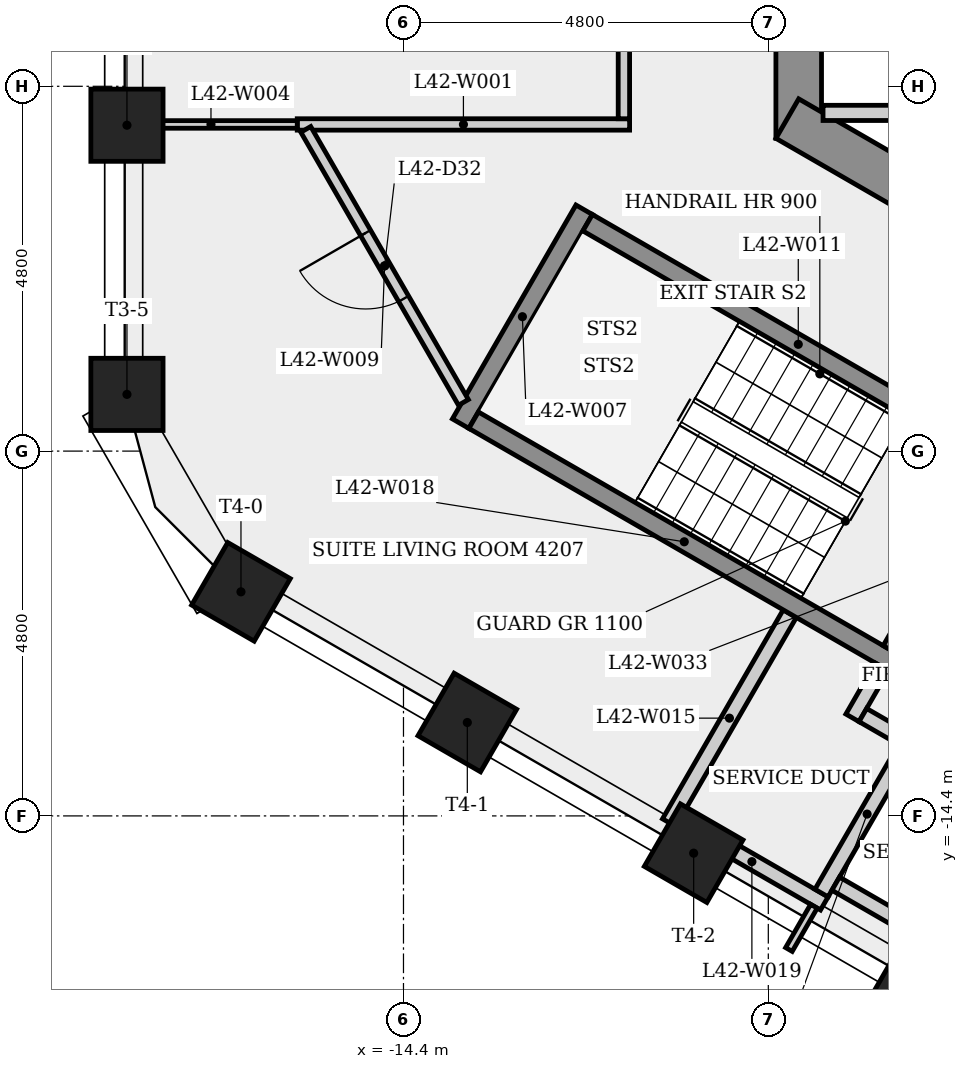
"""IFC4 building model, lengths in metres.
Left out: names, types, materials, properties, quantities, classifications, styles, units other than length and angle.
Written with IfcOpenShell. Run it as: python <this file> out.ifc"""

import sys

from ifc_helpers import new_model, si_unit, direction, frame, frame_2d, origin, origin_2d, place, context, subcontext, project, spatial, rectangle, extrude, element, fill, save


model = new_model("IFC4")
c1 = context("Model", 3, precision=1e-05, world=origin(), true_north=direction((0.0, 1.0)))
c2 = subcontext(c1, "Body", "Model", "MODEL_VIEW")
j1 = project(units=[si_unit("LENGTHUNIT", "METRE"), si_unit("PLANEANGLEUNIT", "RADIAN")], contexts=[c1])
p1 = place(None, origin())
s1 = spatial("IfcSite", under=j1, at=p1, CompositionType="ELEMENT")
p2 = place(p1, origin())
s2 = spatial("IfcBuilding", under=s1, at=p2, CompositionType="ELEMENT")
p3 = place(p2, frame((0.0, 0.0, 159.5)))
s3 = spatial("IfcBuildingStorey", under=s2, at=p3, CompositionType="ELEMENT", Elevation=159.5)
p4 = place(p3, frame((-9.2, 5.485, 0.0), z_axis=(0.0, 0.0, 1.0), x_axis=(0.0, -1.0, 0.0)))
e1 = element("IfcWall", 1, at=p4, inside=s3, PredefinedType="SHEAR", context=c2, shape_type="SweptSolid", body=[
    extrude(rectangle(XDim=10.97, YDim=0.6, at=frame_2d((5.485, 0.0))), origin(), (0.0, 0.0, 1.0), 3.4),
])
p5 = place(p4, frame((8.516, 0.0, 0.0)))
e2 = element("IfcOpeningElement", 2, at=p5, cuts=e1, PredefinedType="OPENING", context=c2, shape_type="SweptSolid", body=[
    extrude(rectangle(XDim=0.9, YDim=2.1, at=frame_2d((0.45, 1.05))), frame((0.0, 0.31, 0.0), z_axis=(0.0, -1.0, 0.0), x_axis=(1.0, 0.0, 0.0)), (0.0, 0.0, 1.0), 0.62),
])
p6 = place(p4, frame((4.685, 0.0, 0.0)))
e3 = element("IfcOpeningElement", 3, at=p6, cuts=e1, PredefinedType="OPENING", context=c2, shape_type="SweptSolid", body=[
    extrude(rectangle(XDim=1.6, YDim=2.1, at=frame_2d((0.8, 1.05))), frame((0.0, 0.31, 0.0), z_axis=(0.0, -1.0, 0.0), x_axis=(1.0, 0.0, 0.0)), (0.0, 0.0, 1.0), 0.62),
])
p7 = place(p3, frame((-9.35, -5.225, 0.0), z_axis=(0.0, 0.0, 1.0), x_axis=(0.866023993627, -0.500002442456, 0.0)))
e4 = element("IfcWall", 4, at=p7, inside=s3, PredefinedType="SHEAR", context=c2, shape_type="SweptSolid", body=[
    extrude(rectangle(XDim=10.97, YDim=0.6, at=frame_2d((5.485, 0.0))), origin(), (0.0, 0.0, 1.0), 3.4),
])
p8 = place(p7, frame((4.816, 0.0, 0.0)))
e5 = element("IfcOpeningElement", 5, at=p8, cuts=e4, PredefinedType="OPENING", context=c2, shape_type="SweptSolid", body=[
    extrude(rectangle(XDim=0.9, YDim=2.1, at=frame_2d((0.45, 1.05))), frame((0.0, 0.31, 0.0), z_axis=(0.0, -1.0, 0.0), x_axis=(1.0, 0.0, 0.0)), (0.0, 0.0, 1.0), 0.62),
])
for number, where, z_axis, x_axis in (
    (6, (-18.038, -5.312, 0.0), (0.0, 0.0, 1.0), (-1.0, 0.0, 0.0)),
    (7, (-18.038, -8.854, 0.0), (0.0, 0.0, 1.0), (-1.0, 0.0, 0.0)),
    (8, (-16.538, -11.452, 0.0), (0.0, 0.0, 1.0), (-0.5, -0.866, 0.0)),
    (9, (-13.56, -13.171, 0.0), (0.0, 0.0, 1.0), (-0.5, -0.866, 0.0)),
    (10, (-10.582, -14.89, 0.0), (0.0, 0.0, 1.0), (-0.5, -0.866, 0.0)),
    (11, (-7.604, -16.61, 0.0), (0.0, 0.0, 1.0), (-0.5, -0.866, 0.0)),
):
    element("IfcColumn", number, at=place(p3, frame(where, z_axis=z_axis, x_axis=x_axis)), inside=s3, PredefinedType="COLUMN", context=c2, shape_type="SweptSolid", body=[
        extrude(rectangle(XDim=0.95, YDim=0.95, at=origin_2d()), origin(), (0.0, 0.0, 1.0), 3.4),
    ])
p9 = place(p3, frame((-15.798, -5.302, 0.0), z_axis=(0.0, 0.0, 1.0), x_axis=(1.0, 0.0, 0.0)))
e12 = element("IfcWall", 12, at=p9, inside=s3, PredefinedType="PARTITIONING", context=c2, shape_type="SweptSolid", body=[
    extrude(rectangle(XDim=4.373, YDim=0.15, at=frame_2d((2.187, 0.0))), origin(), (0.0, 0.0, 1.0), 3.05),
])
p10 = place(p3, frame((-15.798, -5.302, 0.0), z_axis=(0.0, 0.0, 1.0), x_axis=(-1.0, 0.0, 0.0)))
e13 = element("IfcWall", 13, at=p10, inside=s3, PredefinedType="PARTITIONING", context=c2, shape_type="SweptSolid", body=[
    extrude(rectangle(XDim=2.27, YDim=0.1, at=frame_2d((1.135, 0.0))), origin(), (0.0, 0.0, 1.0), 3.05),
])
p11 = place(p3, frame((-13.648, -9.239, 0.0), z_axis=(0.0, 0.0, 1.0), x_axis=(0.500017246033, 0.866015446554, 0.0)))
e14 = element("IfcWall", 14, at=p11, inside=s3, PredefinedType="SHEAR", context=c2, shape_type="SweptSolid", body=[
    extrude(rectangle(XDim=3.25, YDim=0.25, at=frame_2d((1.625, 0.0))), origin(), (0.0, 0.0, 1.0), 3.05),
])
p12 = place(p3, frame((-13.611, -8.959, 0.0), z_axis=(0.0, 0.0, 1.0), x_axis=(-0.499994179242, 0.866028764375, 0.0)))
e15 = element("IfcWall", 15, at=p12, inside=s3, PredefinedType="PARTITIONING", context=c2, shape_type="SweptSolid", body=[
    extrude(rectangle(XDim=4.148, YDim=0.15, at=frame_2d((2.074, 0.0))), origin(), (0.0, 0.0, 1.0), 3.05),
])
p13 = place(p12, frame((1.574, 0.0, 0.0)))
e16 = element("IfcOpeningElement", 16, at=p13, cuts=e15, PredefinedType="OPENING", context=c2, shape_type="SweptSolid", body=[
    extrude(rectangle(XDim=1.0, YDim=2.1, at=frame_2d((0.5, 1.05))), frame((0.0, 0.085, 0.0), z_axis=(0.0, -1.0, 0.0), x_axis=(1.0, 0.0, 0.0)), (0.0, 0.0, 1.0), 0.17),
])
p14 = place(p3, frame((-11.977, -6.595, 0.0), z_axis=(0.0, 0.0, 1.0), x_axis=(0.866025499775, -0.499999833739, 0.0)))
e17 = element("IfcWall", 17, at=p14, inside=s3, PredefinedType="SHEAR", context=c2, shape_type="SweptSolid", body=[
    extrude(rectangle(XDim=6.4, YDim=0.25, at=frame_2d((3.2, 0.0))), origin(), (0.0, 0.0, 1.0), 3.05),
])
p15 = place(p14, frame((5.025, 0.0, 0.0)))
e18 = element("IfcOpeningElement", 18, at=p15, cuts=e17, PredefinedType="OPENING", context=c2, shape_type="SweptSolid", body=[
    extrude(rectangle(XDim=1.0, YDim=2.1, at=frame_2d((0.5, 1.05))), frame((0.0, 0.135, 0.0), z_axis=(0.0, -1.0, 0.0), x_axis=(1.0, 0.0, 0.0)), (0.0, 0.0, 1.0), 0.27),
])
p16 = place(p3, frame((-11.5, -5.227, 0.0), z_axis=(0.0, 0.0, 1.0), x_axis=(0.0, 1.0, 0.0)))
e19 = element("IfcWall", 19, at=p16, inside=s3, PredefinedType="PARTITIONING", context=c2, shape_type="SweptSolid", body=[
    extrude(rectangle(XDim=10.604, YDim=0.15, at=frame_2d((5.302, 0.0))), origin(), (0.0, 0.0, 1.0), 3.05),
])
p17 = place(p16, frame((9.229, 0.0, 0.0)))
e20 = element("IfcOpeningElement", 20, at=p17, cuts=e19, PredefinedType="OPENING", context=c2, shape_type="SweptSolid", body=[
    extrude(rectangle(XDim=0.9, YDim=2.1, at=frame_2d((0.45, 1.05))), frame((0.0, 0.085, 0.0), z_axis=(0.0, -1.0, 0.0), x_axis=(1.0, 0.0, 0.0)), (0.0, 0.0, 1.0), 0.17),
])
p18 = place(p16, frame((2.982, 0.0, 0.0)))
e21 = element("IfcOpeningElement", 21, at=p18, cuts=e19, PredefinedType="OPENING", context=c2, shape_type="SweptSolid", body=[
    extrude(rectangle(XDim=1.0, YDim=2.1, at=frame_2d((0.5, 1.05))), frame((0.0, 0.085, 0.0), z_axis=(0.0, -1.0, 0.0), x_axis=(1.0, 0.0, 0.0)), (0.0, 0.0, 1.0), 0.17),
])
p19 = place(p3, frame((-10.905, -14.489, 0.0), z_axis=(0.0, 0.0, 1.0), x_axis=(0.499959856469, 0.866048579423, 0.0)))
e22 = element("IfcWall", 22, at=p19, inside=s3, PredefinedType="PLUMBINGWALL", context=c2, shape_type="SweptSolid", body=[
    extrude(rectangle(XDim=3.175, YDim=0.2, at=frame_2d((1.587, 0.0))), origin(), (0.0, 0.0, 1.0), 3.05),
])
p20 = place(p3, frame((-13.477, -9.193, 0.0), z_axis=(0.0, 0.0, 1.0), x_axis=(0.866025499775, -0.499999833739, 0.0)))
e23 = element("IfcWall", 23, at=p20, inside=s3, PredefinedType="SHEAR", context=c2, shape_type="SweptSolid", body=[
    extrude(rectangle(XDim=6.4, YDim=0.25, at=frame_2d((3.2, 0.0))), origin(), (0.0, 0.0, 1.0), 3.05),
])
p21 = place(p3, frame((-8.863, -15.552, 0.0), z_axis=(0.0, 0.0, 1.0), x_axis=(-0.866035918664, 0.499981787252, 0.0)))
e24 = element("IfcWall", 24, at=p21, inside=s3, PredefinedType="PLUMBINGWALL", context=c2, shape_type="SweptSolid", body=[
    extrude(rectangle(XDim=2.2, YDim=0.2, at=frame_2d((1.1, 0.0))), origin(), (0.0, 0.0, 1.0), 3.05),
])
p22 = place(p3, frame((-9.0, -15.588, 0.0), z_axis=(0.0, 0.0, 1.0), x_axis=(-0.500011643316, -0.866018681408, 0.0)))
e25 = element("IfcWall", 25, at=p22, inside=s3, PredefinedType="PARTITIONING", context=c2, shape_type="SweptSolid", body=[
    extrude(rectangle(XDim=0.658, YDim=0.1, at=frame_2d((0.329, 0.0))), origin(), (0.0, 0.0, 1.0), 3.05),
])
p23 = place(p3, frame((-8.88, -5.15, 0.0), z_axis=(0.0, 0.0, 1.0), x_axis=(1.0, 0.0, 0.0)))
e26 = element("IfcWall", 26, at=p23, inside=s3, PredefinedType="PARTITIONING", context=c2, shape_type="SweptSolid", body=[
    extrude(rectangle(XDim=11.205, YDim=0.2, at=frame_2d((5.603, 0.0))), origin(), (0.0, 0.0, 1.0), 3.05),
])
p24 = place(p3, frame((-8.493, -13.11, 0.0), z_axis=(0.0, 0.0, 1.0), x_axis=(0.500067724834, 0.865986299303, 0.0)))
e27 = element("IfcWall", 27, at=p24, inside=s3, PredefinedType="PLUMBINGWALL", context=c2, shape_type="SweptSolid", body=[
    extrude(rectangle(XDim=0.775, YDim=0.2, at=frame_2d((0.388, 0.0))), origin(), (0.0, 0.0, 1.0), 3.05),
])
p25 = place(p3, frame((-7.7, -13.337, 0.0), z_axis=(0.0, 0.0, 1.0), x_axis=(-0.500001309137, -0.866024647952, 0.0)))
e28 = element("IfcWall", 28, at=p25, inside=s3, PredefinedType="PLUMBINGWALL", context=c2, shape_type="SweptSolid", body=[
    extrude(rectangle(XDim=2.4, YDim=0.2, at=frame_2d((1.2, 0.0))), origin(), (0.0, 0.0, 1.0), 3.05),
])
p26 = place(p3, frame((-7.836, -13.373, 0.0), z_axis=(0.0, 0.0, 1.0), x_axis=(-0.866232998003, 0.499640263761, 0.0)))
e29 = element("IfcWall", 29, at=p26, inside=s3, PredefinedType="PLUMBINGWALL", context=c2, shape_type="SweptSolid", body=[
    extrude(rectangle(XDim=0.6, YDim=0.2, at=frame_2d((0.3, 0.0))), origin(), (0.0, 0.0, 1.0), 3.05),
])
p27 = place(p3, frame((-6.808, -16.392, 0.0), z_axis=(0.0, 0.0, 1.0), x_axis=(-0.866008176907, 0.50002983664, 0.0)))
e30 = element("IfcWall", 30, at=p27, inside=s3, PredefinedType="PLUMBINGWALL", context=c2, shape_type="SweptSolid", body=[
    extrude(rectangle(XDim=2.2, YDim=0.2, at=frame_2d((1.1, 0.0))), origin(), (0.0, 0.0, 1.0), 3.05),
])
p28 = place(p3, frame((-6.605, -9.841, 0.0), z_axis=(0.0, 0.0, 1.0), x_axis=(-0.499996545922, -0.866027397988, 0.0)))
e31 = element("IfcWall", 31, at=p28, inside=s3, PredefinedType="SHEAR", context=c2, shape_type="SweptSolid", body=[
    extrude(rectangle(XDim=2.75, YDim=0.25, at=frame_2d((1.375, 0.0))), origin(), (0.0, 0.0, 1.0), 3.05),
])
p29 = place(p28, frame((0.875, 0.0, 0.0)))
e32 = element("IfcOpeningElement", 32, at=p29, cuts=e31, PredefinedType="OPENING", context=c2, shape_type="SweptSolid", body=[
    extrude(rectangle(XDim=1.0, YDim=2.1, at=frame_2d((0.5, 1.05))), frame((0.0, 0.135, 0.0), z_axis=(0.0, -1.0, 0.0), x_axis=(1.0, 0.0, 0.0)), (0.0, 0.0, 1.0), 0.27),
])
p30 = place(p13, origin())
e33 = element("IfcDoor", 33, at=p30, inside=s3, OperationType="SINGLE_SWING_RIGHT", PredefinedType="DOOR", context=c2, shape_type="SweptSolid", body=[
    extrude(rectangle(XDim=1.0, YDim=2.1, at=frame_2d((0.5, 1.05))), frame((0.0, 0.025, 0.0), z_axis=(0.0, -1.0, 0.0), x_axis=(1.0, 0.0, 0.0)), (0.0, 0.0, 1.0), 0.05),
])
fill(e16, e33)
save(model, sys.argv[1])
